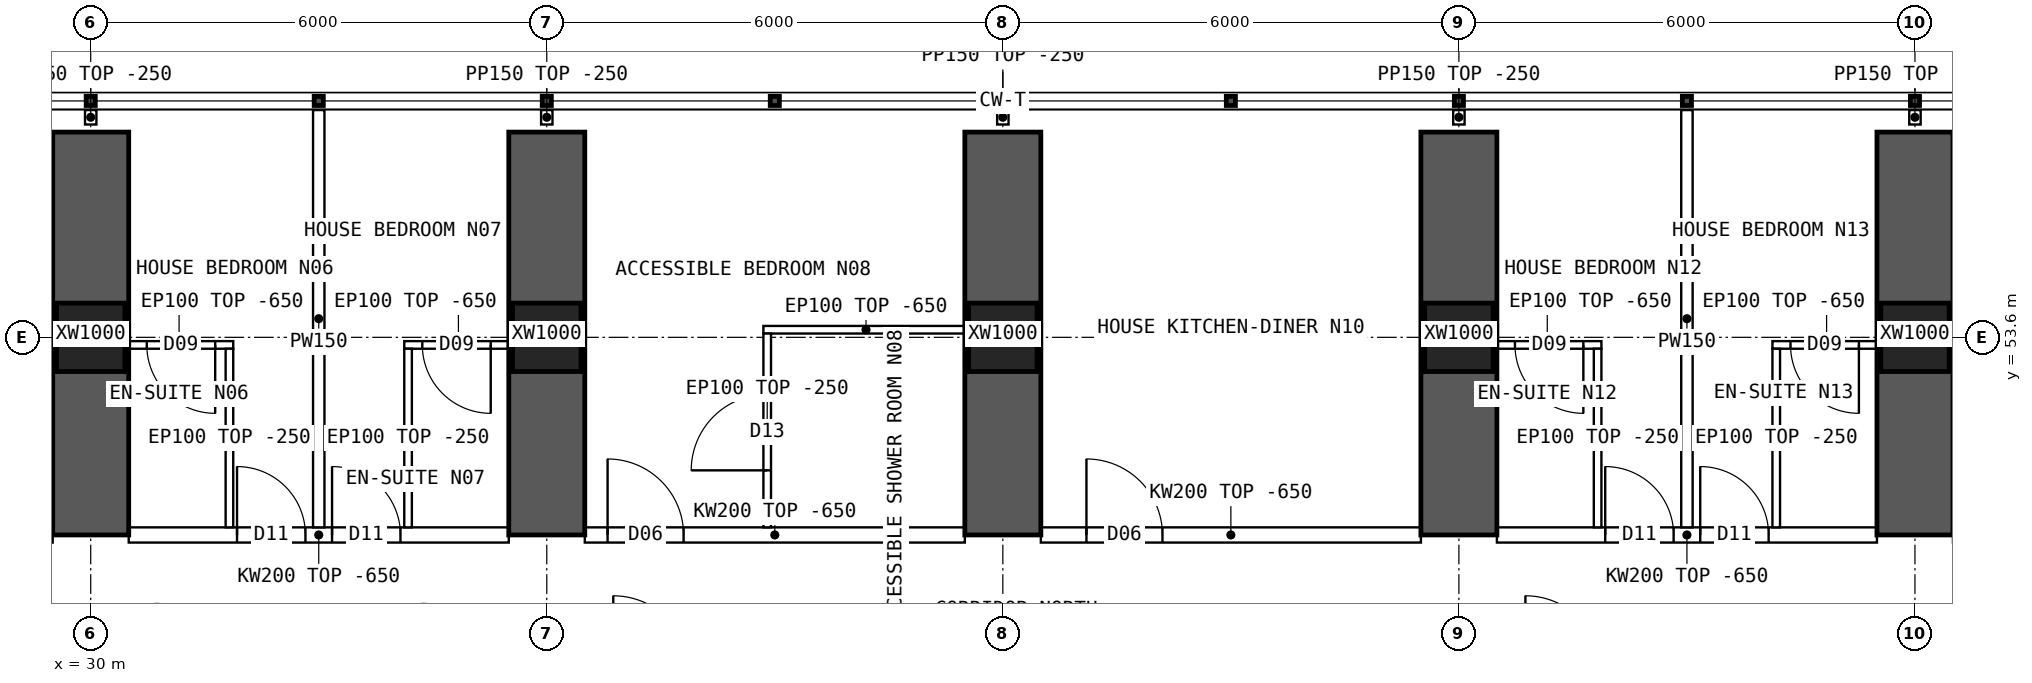
"""IFC4 building model, lengths in metres.
Left out: names, types, materials, properties, quantities, classifications, styles, units other than length and angle.
Written with IfcOpenShell. Run it as: python <this file> out.ifc"""

import sys

from ifc_helpers import new_model, si_unit, direction, frame, frame_2d, origin, origin_2d, place, context, subcontext, project, spatial, polyline, rectangle, hollow_rectangle, outline, extrude, element, fill, save


model = new_model("IFC4")
c1 = context("Model", 3, precision=1e-05, world=origin(), true_north=direction((0.0, 1.0)))
c2 = subcontext(c1, "Body", "Model", "MODEL_VIEW")
j1 = project(units=[si_unit("LENGTHUNIT", "METRE"), si_unit("PLANEANGLEUNIT", "RADIAN")], contexts=[c1])
p1 = place(None, origin())
s1 = spatial("IfcSite", under=j1, at=p1, CompositionType="ELEMENT")
p2 = place(p1, origin())
s2 = spatial("IfcBuilding", under=s1, at=p2, CompositionType="ELEMENT")
p3 = place(p2, frame((0.0, 0.0, 27.7)))
s3 = spatial("IfcBuildingStorey", under=s2, at=p3, CompositionType="ELEMENT", Elevation=27.7)
for number, where, z_axis, x_axis in (
    (1, (30.0, 53.6, 0.0), (0.0, 0.0, 1.0), (1.0, 0.0, 0.0)),
    (2, (36.0, 53.6, 0.0), (0.0, 0.0, 1.0), (1.0, 0.0, 0.0)),
    (3, (42.0, 53.6, 0.0), (0.0, 0.0, 1.0), (1.0, 0.0, 0.0)),
    (4, (48.0, 53.6, 0.0), (0.0, 0.0, 1.0), (1.0, 0.0, 0.0)),
    (5, (54.0, 53.6, 0.0), (0.0, 0.0, 1.0), (1.0, 0.0, 0.0)),
):
    element("IfcColumn", number, at=place(p3, frame(where, z_axis=z_axis, x_axis=x_axis)), inside=s3, PredefinedType="COLUMN", context=c2, shape_type="SweptSolid", body=[
        extrude(hollow_rectangle(XDim=0.9, YDim=0.9, WallThickness=0.09, at=origin_2d()), origin(), (0.0, 0.0, 1.0), 3.75),
    ])
for number, where, z_axis, x_axis in (
    (6, (30.0, 51.0, 0.0), (0.0, 0.0, 1.0), (0.0, 1.0, 0.0)),
    (7, (36.0, 51.0, 0.0), (0.0, 0.0, 1.0), (0.0, 1.0, 0.0)),
    (8, (42.0, 51.0, 0.0), (0.0, 0.0, 1.0), (0.0, 1.0, 0.0)),
    (9, (48.0, 51.0, 0.0), (0.0, 0.0, 1.0), (0.0, 1.0, 0.0)),
    (10, (54.0, 51.0, 0.0), (0.0, 0.0, 1.0), (0.0, 1.0, 0.0)),
):
    element("IfcWall", number, at=place(p3, frame(where, z_axis=z_axis, x_axis=x_axis)), inside=s3, PredefinedType="SHEAR", context=c2, shape_type="SweptSolid", body=[
        extrude(rectangle(XDim=5.3, YDim=1.0, at=frame_2d((2.65, 0.0))), origin(), (0.0, 0.0, 1.0), 3.75),
    ])
p4 = place(p3, frame((30.5, 51.0, 0.0), z_axis=(0.0, 0.0, 1.0), x_axis=(1.0, 0.0, 0.0)))
e11 = element("IfcWall", 11, at=p4, inside=s3, PredefinedType="SOLIDWALL", context=c2, shape_type="SweptSolid", body=[
    extrude(outline(polyline([(0.0, 0.0), (5.0, 0.0), (5.0, 3.1), (0.0, 3.1), (0.0, 0.0)])), frame((0.0, 0.1, 0.0), z_axis=(0.0, -1.0, 0.0), x_axis=(1.0, 0.0, 0.0)), (0.0, 0.0, 1.0), 0.2),
])
p5 = place(p4, frame((1.425, 0.0, 0.0)))
e12 = element("IfcOpeningElement", 12, at=p5, cuts=e11, PredefinedType="OPENING", context=c2, shape_type="SweptSolid", body=[
    extrude(rectangle(XDim=0.9, YDim=2.1, at=frame_2d((0.45, 1.05))), frame((0.0, 0.11, 0.0), z_axis=(0.0, -1.0, 0.0), x_axis=(1.0, 0.0, 0.0)), (0.0, 0.0, 1.0), 0.22),
])
p6 = place(p4, frame((2.675, 0.0, 0.0)))
e13 = element("IfcOpeningElement", 13, at=p6, cuts=e11, PredefinedType="OPENING", context=c2, shape_type="SweptSolid", body=[
    extrude(rectangle(XDim=0.9, YDim=2.1, at=frame_2d((0.45, 1.05))), frame((0.0, 0.11, 0.0), z_axis=(0.0, -1.0, 0.0), x_axis=(1.0, 0.0, 0.0)), (0.0, 0.0, 1.0), 0.22),
])
p7 = place(p3, frame((36.5, 51.0, 0.0), z_axis=(0.0, 0.0, 1.0), x_axis=(1.0, 0.0, 0.0)))
e14 = element("IfcWall", 14, at=p7, inside=s3, PredefinedType="SOLIDWALL", context=c2, shape_type="SweptSolid", body=[
    extrude(outline(polyline([(0.0, 0.0), (5.0, 0.0), (5.0, 3.1), (0.0, 3.1), (0.0, 0.0)])), frame((0.0, 0.1, 0.0), z_axis=(0.0, -1.0, 0.0), x_axis=(1.0, 0.0, 0.0)), (0.0, 0.0, 1.0), 0.2),
])
p8 = place(p7, frame((0.3, 0.0, 0.0)))
e15 = element("IfcOpeningElement", 15, at=p8, cuts=e14, PredefinedType="OPENING", context=c2, shape_type="SweptSolid", body=[
    extrude(rectangle(XDim=1.0, YDim=2.1, at=frame_2d((0.5, 1.05))), frame((0.0, 0.11, 0.0), z_axis=(0.0, -1.0, 0.0), x_axis=(1.0, 0.0, 0.0)), (0.0, 0.0, 1.0), 0.22),
])
p9 = place(p3, frame((42.5, 51.0, 0.0), z_axis=(0.0, 0.0, 1.0), x_axis=(1.0, 0.0, 0.0)))
e16 = element("IfcWall", 16, at=p9, inside=s3, PredefinedType="SOLIDWALL", context=c2, shape_type="SweptSolid", body=[
    extrude(outline(polyline([(0.0, 0.0), (5.0, 0.0), (5.0, 3.1), (0.0, 3.1), (0.0, 0.0)])), frame((0.0, 0.1, 0.0), z_axis=(0.0, -1.0, 0.0), x_axis=(1.0, 0.0, 0.0)), (0.0, 0.0, 1.0), 0.2),
])
p10 = place(p9, frame((0.6, 0.0, 0.0)))
e17 = element("IfcOpeningElement", 17, at=p10, cuts=e16, PredefinedType="OPENING", context=c2, shape_type="SweptSolid", body=[
    extrude(rectangle(XDim=1.0, YDim=2.1, at=frame_2d((0.5, 1.05))), frame((0.0, 0.11, 0.0), z_axis=(0.0, -1.0, 0.0), x_axis=(1.0, 0.0, 0.0)), (0.0, 0.0, 1.0), 0.22),
])
p11 = place(p3, frame((48.5, 51.0, 0.0), z_axis=(0.0, 0.0, 1.0), x_axis=(1.0, 0.0, 0.0)))
e18 = element("IfcWall", 18, at=p11, inside=s3, PredefinedType="SOLIDWALL", context=c2, shape_type="SweptSolid", body=[
    extrude(outline(polyline([(0.0, 0.0), (5.0, 0.0), (5.0, 3.1), (0.0, 3.1), (0.0, 0.0)])), frame((0.0, 0.1, 0.0), z_axis=(0.0, -1.0, 0.0), x_axis=(1.0, 0.0, 0.0)), (0.0, 0.0, 1.0), 0.2),
])
p12 = place(p11, frame((1.425, 0.0, 0.0)))
e19 = element("IfcOpeningElement", 19, at=p12, cuts=e18, PredefinedType="OPENING", context=c2, shape_type="SweptSolid", body=[
    extrude(rectangle(XDim=0.9, YDim=2.1, at=frame_2d((0.45, 1.05))), frame((0.0, 0.11, 0.0), z_axis=(0.0, -1.0, 0.0), x_axis=(1.0, 0.0, 0.0)), (0.0, 0.0, 1.0), 0.22),
])
p13 = place(p11, frame((2.675, 0.0, 0.0)))
e20 = element("IfcOpeningElement", 20, at=p13, cuts=e18, PredefinedType="OPENING", context=c2, shape_type="SweptSolid", body=[
    extrude(rectangle(XDim=0.9, YDim=2.1, at=frame_2d((0.45, 1.05))), frame((0.0, 0.11, 0.0), z_axis=(0.0, -1.0, 0.0), x_axis=(1.0, 0.0, 0.0)), (0.0, 0.0, 1.0), 0.22),
])
p14 = place(p3, frame((33.0, 56.59, 0.0), z_axis=(0.0, 0.0, 1.0), x_axis=(0.0, -1.0, 0.0)))
e21 = element("IfcWall", 21, at=p14, inside=s3, PredefinedType="PARTITIONING", context=c2, shape_type="SweptSolid", body=[
    extrude(outline(polyline([(0.0, 0.0), (5.49, 0.0), (5.49, 3.1), (5.442, 3.1), (5.44, 3.5), (3.192, 3.5), (3.19, 3.1), (2.792, 3.1), (2.79, 3.5), (0.0, 3.5), (0.0, 0.0)])), frame((0.0, 0.075, 0.0), z_axis=(0.0, -1.0, 0.0), x_axis=(1.0, 0.0, 0.0)), (0.0, 0.0, 1.0), 0.15),
])
p15 = place(p3, frame((30.45, 53.5, 0.0), z_axis=(0.0, 0.0, 1.0), x_axis=(1.0, 0.0, 0.0)))
e22 = element("IfcWall", 22, at=p15, inside=s3, PredefinedType="PARTITIONING", context=c2, shape_type="SweptSolid", body=[
    extrude(outline(polyline([(0.0, 0.0), (1.425, 0.0), (1.425, 3.1), (0.0, 3.1), (0.0, 0.0)])), frame((0.0, 0.05, 0.0), z_axis=(0.0, -1.0, 0.0), x_axis=(1.0, 0.0, 0.0)), (0.0, 0.0, 1.0), 0.1),
])
p16 = place(p15, frame((0.288, 0.0, 0.0)))
e23 = element("IfcOpeningElement", 23, at=p16, cuts=e22, PredefinedType="OPENING", context=c2, shape_type="SweptSolid", body=[
    extrude(rectangle(XDim=0.9, YDim=2.1, at=frame_2d((0.45, 1.05))), frame((0.0, 0.06, 0.0), z_axis=(0.0, -1.0, 0.0), x_axis=(1.0, 0.0, 0.0)), (0.0, 0.0, 1.0), 0.12),
])
p17 = place(p3, frame((31.825, 53.45, 0.0), z_axis=(0.0, 0.0, 1.0), x_axis=(0.0, -1.0, 0.0)))
e24 = element("IfcWall", 24, at=p17, inside=s3, PredefinedType="PARTITIONING", context=c2, shape_type="SweptSolid", body=[
    extrude(outline(polyline([(0.0, 0.0), (2.35, 0.0), (2.35, 3.1), (2.302, 3.1), (2.3, 3.5), (0.052, 3.5), (0.05, 3.1), (0.0, 3.1), (0.0, 0.0)])), frame((0.0, 0.05, 0.0), z_axis=(0.0, -1.0, 0.0), x_axis=(1.0, 0.0, 0.0)), (0.0, 0.0, 1.0), 0.1),
])
p18 = place(p3, frame((34.125, 53.5, 0.0), z_axis=(0.0, 0.0, 1.0), x_axis=(1.0, 0.0, 0.0)))
e25 = element("IfcWall", 25, at=p18, inside=s3, PredefinedType="PARTITIONING", context=c2, shape_type="SweptSolid", body=[
    extrude(outline(polyline([(0.0, 0.0), (1.425, 0.0), (1.425, 3.1), (0.0, 3.1), (0.0, 0.0)])), frame((0.0, 0.05, 0.0), z_axis=(0.0, -1.0, 0.0), x_axis=(1.0, 0.0, 0.0)), (0.0, 0.0, 1.0), 0.1),
])
p19 = place(p18, frame((0.238, 0.0, 0.0)))
e26 = element("IfcOpeningElement", 26, at=p19, cuts=e25, PredefinedType="OPENING", context=c2, shape_type="SweptSolid", body=[
    extrude(rectangle(XDim=0.9, YDim=2.1, at=frame_2d((0.45, 1.05))), frame((0.0, 0.06, 0.0), z_axis=(0.0, -1.0, 0.0), x_axis=(1.0, 0.0, 0.0)), (0.0, 0.0, 1.0), 0.12),
])
p20 = place(p3, frame((34.175, 53.45, 0.0), z_axis=(0.0, 0.0, 1.0), x_axis=(0.0, -1.0, 0.0)))
e27 = element("IfcWall", 27, at=p20, inside=s3, PredefinedType="PARTITIONING", context=c2, shape_type="SweptSolid", body=[
    extrude(outline(polyline([(0.0, 0.0), (2.35, 0.0), (2.35, 3.1), (2.302, 3.1), (2.3, 3.5), (0.052, 3.5), (0.05, 3.1), (0.0, 3.1), (0.0, 0.0)])), frame((0.0, 0.05, 0.0), z_axis=(0.0, -1.0, 0.0), x_axis=(1.0, 0.0, 0.0)), (0.0, 0.0, 1.0), 0.1),
])
p21 = place(p3, frame((38.85, 53.7, 0.0), z_axis=(0.0, 0.0, 1.0), x_axis=(1.0, 0.0, 0.0)))
e28 = element("IfcWall", 28, at=p21, inside=s3, PredefinedType="PARTITIONING", context=c2, shape_type="SweptSolid", body=[
    extrude(outline(polyline([(0.0, 0.0), (2.7, 0.0), (2.7, 3.1), (0.0, 3.1), (0.0, 0.0)])), frame((0.0, 0.05, 0.0), z_axis=(0.0, -1.0, 0.0), x_axis=(1.0, 0.0, 0.0)), (0.0, 0.0, 1.0), 0.1),
])
p22 = place(p3, frame((38.9, 53.65, 0.0), z_axis=(0.0, 0.0, 1.0), x_axis=(0.0, -1.0, 0.0)))
e29 = element("IfcWall", 29, at=p22, inside=s3, PredefinedType="PARTITIONING", context=c2, shape_type="SweptSolid", body=[
    extrude(outline(polyline([(0.0, 0.0), (2.55, 0.0), (2.55, 3.1), (2.502, 3.1), (2.5, 3.5), (0.252, 3.5), (0.25, 3.1), (0.0, 3.1), (0.0, 0.0)])), frame((0.0, 0.05, 0.0), z_axis=(0.0, -1.0, 0.0), x_axis=(1.0, 0.0, 0.0)), (0.0, 0.0, 1.0), 0.1),
])
p23 = place(p22, frame((0.8, 0.0, 0.0)))
e30 = element("IfcOpeningElement", 30, at=p23, cuts=e29, PredefinedType="OPENING", context=c2, shape_type="SweptSolid", body=[
    extrude(rectangle(XDim=1.0, YDim=2.1, at=frame_2d((0.5, 1.05))), frame((0.0, 0.06, 0.0), z_axis=(0.0, -1.0, 0.0), x_axis=(1.0, 0.0, 0.0)), (0.0, 0.0, 1.0), 0.12),
])
p24 = place(p3, frame((51.0, 56.59, 0.0), z_axis=(0.0, 0.0, 1.0), x_axis=(0.0, -1.0, 0.0)))
e31 = element("IfcWall", 31, at=p24, inside=s3, PredefinedType="PARTITIONING", context=c2, shape_type="SweptSolid", body=[
    extrude(outline(polyline([(0.0, 0.0), (5.49, 0.0), (5.49, 3.1), (5.442, 3.1), (5.44, 3.5), (3.192, 3.5), (3.19, 3.1), (2.792, 3.1), (2.79, 3.5), (0.0, 3.5), (0.0, 0.0)])), frame((0.0, 0.075, 0.0), z_axis=(0.0, -1.0, 0.0), x_axis=(1.0, 0.0, 0.0)), (0.0, 0.0, 1.0), 0.15),
])
p25 = place(p3, frame((48.45, 53.5, 0.0), z_axis=(0.0, 0.0, 1.0), x_axis=(1.0, 0.0, 0.0)))
e32 = element("IfcWall", 32, at=p25, inside=s3, PredefinedType="PARTITIONING", context=c2, shape_type="SweptSolid", body=[
    extrude(outline(polyline([(0.0, 0.0), (1.425, 0.0), (1.425, 3.1), (0.0, 3.1), (0.0, 0.0)])), frame((0.0, 0.05, 0.0), z_axis=(0.0, -1.0, 0.0), x_axis=(1.0, 0.0, 0.0)), (0.0, 0.0, 1.0), 0.1),
])
p26 = place(p25, frame((0.288, 0.0, 0.0)))
e33 = element("IfcOpeningElement", 33, at=p26, cuts=e32, PredefinedType="OPENING", context=c2, shape_type="SweptSolid", body=[
    extrude(rectangle(XDim=0.9, YDim=2.1, at=frame_2d((0.45, 1.05))), frame((0.0, 0.06, 0.0), z_axis=(0.0, -1.0, 0.0), x_axis=(1.0, 0.0, 0.0)), (0.0, 0.0, 1.0), 0.12),
])
p27 = place(p3, frame((49.825, 53.45, 0.0), z_axis=(0.0, 0.0, 1.0), x_axis=(0.0, -1.0, 0.0)))
e34 = element("IfcWall", 34, at=p27, inside=s3, PredefinedType="PARTITIONING", context=c2, shape_type="SweptSolid", body=[
    extrude(outline(polyline([(0.0, 0.0), (2.35, 0.0), (2.35, 3.1), (2.302, 3.1), (2.3, 3.5), (0.052, 3.5), (0.05, 3.1), (0.0, 3.1), (0.0, 0.0)])), frame((0.0, 0.05, 0.0), z_axis=(0.0, -1.0, 0.0), x_axis=(1.0, 0.0, 0.0)), (0.0, 0.0, 1.0), 0.1),
])
p28 = place(p3, frame((52.125, 53.5, 0.0), z_axis=(0.0, 0.0, 1.0), x_axis=(1.0, 0.0, 0.0)))
e35 = element("IfcWall", 35, at=p28, inside=s3, PredefinedType="PARTITIONING", context=c2, shape_type="SweptSolid", body=[
    extrude(outline(polyline([(0.0, 0.0), (1.425, 0.0), (1.425, 3.1), (0.0, 3.1), (0.0, 0.0)])), frame((0.0, 0.05, 0.0), z_axis=(0.0, -1.0, 0.0), x_axis=(1.0, 0.0, 0.0)), (0.0, 0.0, 1.0), 0.1),
])
p29 = place(p28, frame((0.238, 0.0, 0.0)))
e36 = element("IfcOpeningElement", 36, at=p29, cuts=e35, PredefinedType="OPENING", context=c2, shape_type="SweptSolid", body=[
    extrude(rectangle(XDim=0.9, YDim=2.1, at=frame_2d((0.45, 1.05))), frame((0.0, 0.06, 0.0), z_axis=(0.0, -1.0, 0.0), x_axis=(1.0, 0.0, 0.0)), (0.0, 0.0, 1.0), 0.12),
])
p30 = place(p3, frame((52.175, 53.45, 0.0), z_axis=(0.0, 0.0, 1.0), x_axis=(0.0, -1.0, 0.0)))
e37 = element("IfcWall", 37, at=p30, inside=s3, PredefinedType="PARTITIONING", context=c2, shape_type="SweptSolid", body=[
    extrude(outline(polyline([(0.0, 0.0), (2.35, 0.0), (2.35, 3.1), (2.302, 3.1), (2.3, 3.5), (0.052, 3.5), (0.05, 3.1), (0.0, 3.1), (0.0, 0.0)])), frame((0.0, 0.05, 0.0), z_axis=(0.0, -1.0, 0.0), x_axis=(1.0, 0.0, 0.0)), (0.0, 0.0, 1.0), 0.1),
])
for number, where, z_axis, x_axis in (
    (38, (30.0, 56.4, 0.0), (0.0, 0.0, 1.0), (0.0, 1.0, 0.0)),
    (39, (36.0, 56.4, 0.0), (0.0, 0.0, 1.0), (0.0, 1.0, 0.0)),
    (40, (42.0, 56.4, 0.0), (0.0, 0.0, 1.0), (0.0, 1.0, 0.0)),
    (41, (48.0, 56.4, 0.0), (0.0, 0.0, 1.0), (0.0, 1.0, 0.0)),
    (42, (54.0, 56.4, 0.0), (0.0, 0.0, 1.0), (0.0, 1.0, 0.0)),
):
    element("IfcWall", number, at=place(p3, frame(where, z_axis=z_axis, x_axis=x_axis)), inside=s3, PredefinedType="PARTITIONING", context=c2, shape_type="SweptSolid", body=[
        extrude(rectangle(XDim=0.19, YDim=0.15, at=frame_2d((0.095, 0.0))), origin(), (0.0, 0.0, 1.0), 3.5),
    ])
p31 = place(p16, origin())
e43 = element("IfcDoor", 43, at=p31, inside=s3, OperationType="SINGLE_SWING_RIGHT", PredefinedType="DOOR", context=c2, shape_type="SweptSolid", body=[
    extrude(rectangle(XDim=0.9, YDim=2.1, at=frame_2d((0.45, 1.05))), frame((0.0, 0.025, 0.0), z_axis=(0.0, -1.0, 0.0), x_axis=(1.0, 0.0, 0.0)), (0.0, 0.0, 1.0), 0.05),
])
fill(e23, e43)
p32 = place(p5, origin())
e44 = element("IfcDoor", 44, at=p32, inside=s3, OperationType="SINGLE_SWING_LEFT", PredefinedType="DOOR", context=c2, shape_type="SweptSolid", body=[
    extrude(rectangle(XDim=0.9, YDim=2.1, at=frame_2d((0.45, 1.05))), frame((0.0, 0.025, 0.0), z_axis=(0.0, -1.0, 0.0), x_axis=(1.0, 0.0, 0.0)), (0.0, 0.0, 1.0), 0.05),
])
fill(e12, e44)
p33 = place(p19, origin())
e45 = element("IfcDoor", 45, at=p33, inside=s3, OperationType="SINGLE_SWING_RIGHT", PredefinedType="DOOR", context=c2, shape_type="SweptSolid", body=[
    extrude(rectangle(XDim=0.9, YDim=2.1, at=frame_2d((0.45, 1.05))), frame((0.0, 0.025, 0.0), z_axis=(0.0, -1.0, 0.0), x_axis=(1.0, 0.0, 0.0)), (0.0, 0.0, 1.0), 0.05),
])
fill(e26, e45)
p34 = place(p6, origin())
e46 = element("IfcDoor", 46, at=p34, inside=s3, OperationType="SINGLE_SWING_LEFT", PredefinedType="DOOR", context=c2, shape_type="SweptSolid", body=[
    extrude(rectangle(XDim=0.9, YDim=2.1, at=frame_2d((0.45, 1.05))), frame((0.0, 0.025, 0.0), z_axis=(0.0, -1.0, 0.0), x_axis=(1.0, 0.0, 0.0)), (0.0, 0.0, 1.0), 0.05),
])
fill(e13, e46)
p35 = place(p23, origin())
e47 = element("IfcDoor", 47, at=p35, inside=s3, OperationType="SINGLE_SWING_RIGHT", PredefinedType="DOOR", context=c2, shape_type="SweptSolid", body=[
    extrude(rectangle(XDim=1.0, YDim=2.1, at=frame_2d((0.5, 1.05))), frame((0.0, 0.025, 0.0), z_axis=(0.0, -1.0, 0.0), x_axis=(1.0, 0.0, 0.0)), (0.0, 0.0, 1.0), 0.05),
])
fill(e30, e47)
p36 = place(p8, origin())
e48 = element("IfcDoor", 48, at=p36, inside=s3, OperationType="SINGLE_SWING_LEFT", PredefinedType="DOOR", context=c2, shape_type="SweptSolid", body=[
    extrude(rectangle(XDim=1.0, YDim=2.1, at=frame_2d((0.5, 1.05))), frame((0.0, 0.025, 0.0), z_axis=(0.0, -1.0, 0.0), x_axis=(1.0, 0.0, 0.0)), (0.0, 0.0, 1.0), 0.05),
])
fill(e15, e48)
p37 = place(p10, origin())
e49 = element("IfcDoor", 49, at=p37, inside=s3, OperationType="SINGLE_SWING_LEFT", PredefinedType="DOOR", context=c2, shape_type="SweptSolid", body=[
    extrude(rectangle(XDim=1.0, YDim=2.1, at=frame_2d((0.5, 1.05))), frame((0.0, 0.025, 0.0), z_axis=(0.0, -1.0, 0.0), x_axis=(1.0, 0.0, 0.0)), (0.0, 0.0, 1.0), 0.05),
])
fill(e17, e49)
p38 = place(p26, origin())
e50 = element("IfcDoor", 50, at=p38, inside=s3, OperationType="SINGLE_SWING_RIGHT", PredefinedType="DOOR", context=c2, shape_type="SweptSolid", body=[
    extrude(rectangle(XDim=0.9, YDim=2.1, at=frame_2d((0.45, 1.05))), frame((0.0, 0.025, 0.0), z_axis=(0.0, -1.0, 0.0), x_axis=(1.0, 0.0, 0.0)), (0.0, 0.0, 1.0), 0.05),
])
fill(e33, e50)
p39 = place(p12, origin())
e51 = element("IfcDoor", 51, at=p39, inside=s3, OperationType="SINGLE_SWING_LEFT", PredefinedType="DOOR", context=c2, shape_type="SweptSolid", body=[
    extrude(rectangle(XDim=0.9, YDim=2.1, at=frame_2d((0.45, 1.05))), frame((0.0, 0.025, 0.0), z_axis=(0.0, -1.0, 0.0), x_axis=(1.0, 0.0, 0.0)), (0.0, 0.0, 1.0), 0.05),
])
fill(e19, e51)
p40 = place(p29, origin())
e52 = element("IfcDoor", 52, at=p40, inside=s3, OperationType="SINGLE_SWING_RIGHT", PredefinedType="DOOR", context=c2, shape_type="SweptSolid", body=[
    extrude(rectangle(XDim=0.9, YDim=2.1, at=frame_2d((0.45, 1.05))), frame((0.0, 0.025, 0.0), z_axis=(0.0, -1.0, 0.0), x_axis=(1.0, 0.0, 0.0)), (0.0, 0.0, 1.0), 0.05),
])
fill(e36, e52)
p41 = place(p13, origin())
e53 = element("IfcDoor", 53, at=p41, inside=s3, OperationType="SINGLE_SWING_LEFT", PredefinedType="DOOR", context=c2, shape_type="SweptSolid", body=[
    extrude(rectangle(XDim=0.9, YDim=2.1, at=frame_2d((0.45, 1.05))), frame((0.0, 0.025, 0.0), z_axis=(0.0, -1.0, 0.0), x_axis=(1.0, 0.0, 0.0)), (0.0, 0.0, 1.0), 0.05),
])
fill(e20, e53)
save(model, sys.argv[1])
